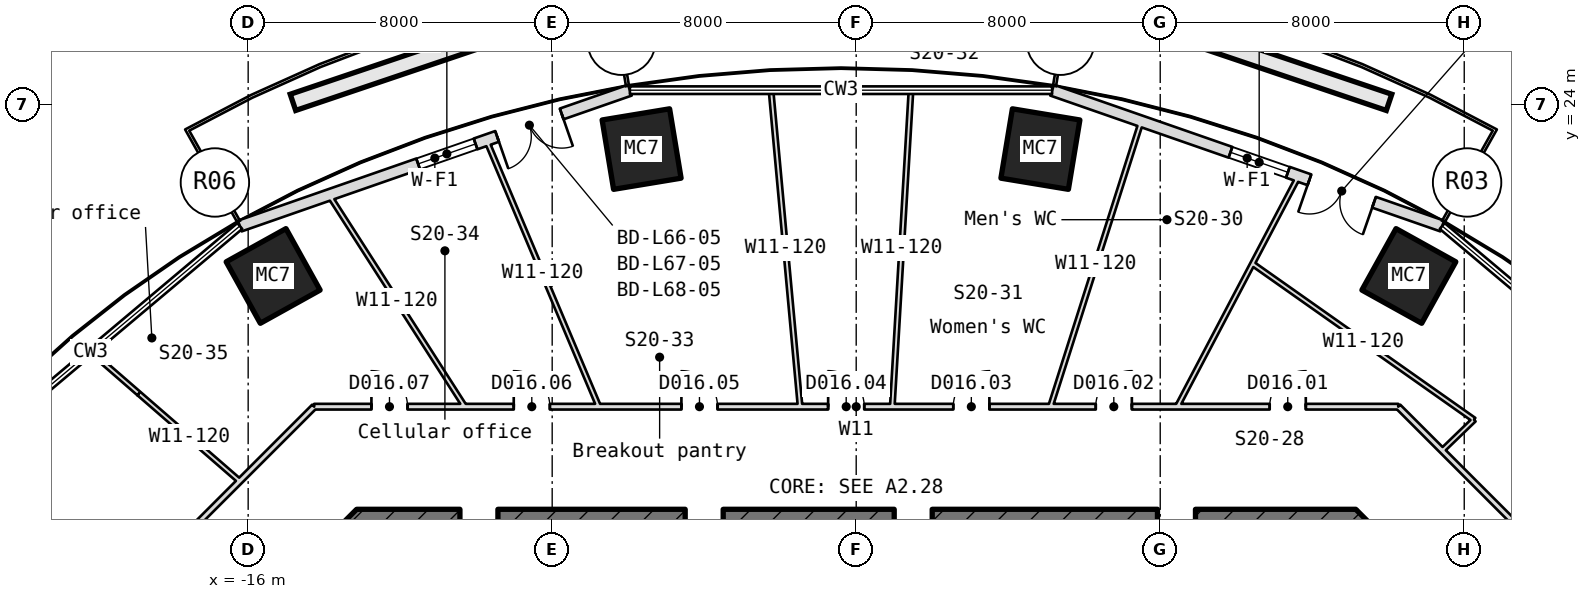
"""IFC4 building model, lengths in metres.
Left out: names, types, materials, properties, quantities, classifications, styles, units other than length and angle.
Written with IfcOpenShell. Run it as: python <this file> out.ifc"""

import sys

from ifc_helpers import new_model, si_unit, direction, frame, frame_2d, origin, origin_2d, place, context, subcontext, project, spatial, rectangle, hollow_rectangle, extrude, element, fill, save


model = new_model("IFC4")
c1 = context("Model", 3, precision=1e-05, world=origin(), true_north=direction((0.0, 1.0)))
c2 = subcontext(c1, "Body", "Model", "MODEL_VIEW")
j1 = project(units=[si_unit("LENGTHUNIT", "METRE"), si_unit("PLANEANGLEUNIT", "RADIAN")], contexts=[c1])
p1 = place(None, origin())
s1 = spatial("IfcSite", under=j1, at=p1, CompositionType="ELEMENT")
p2 = place(p1, origin())
s2 = spatial("IfcBuilding", under=s1, at=p2, CompositionType="ELEMENT")
p3 = place(p2, frame((0.0, 0.0, 296.95)))
s3 = spatial("IfcBuildingStorey", under=s2, at=p3, CompositionType="ELEMENT", Elevation=296.95)
for number, where, z_axis, x_axis in (
    (1, (14.542, 19.49, -0.18), (0.0, 0.0, 1.0), (0.874, -0.486, 0.0)),
    (2, (4.847, 22.828, -0.18), (0.0, 0.0, 1.0), (0.987, -0.163, 0.0)),
    (3, (-5.647, 22.828, -0.18), (0.0, 0.0, 1.0), (0.987, 0.163, 0.0)),
    (4, (-15.343, 19.49, -0.18), (0.0, 0.0, 1.0), (0.874, 0.486, 0.0)),
):
    element("IfcColumn", number, at=place(p3, frame(where, z_axis=z_axis, x_axis=x_axis)), inside=s3, PredefinedType="COLUMN", context=c2, shape_type="SweptSolid", body=[
        extrude(hollow_rectangle(XDim=1.8, YDim=1.85, WallThickness=0.06, at=origin_2d()), origin(), (0.0, 0.0, 1.0), 4.15),
    ])
p4 = place(p3, frame((15.42, 20.804, 0.0), z_axis=(0.0, 0.0, 1.0), x_axis=(-0.944390086162, 0.328827257323, 0.0)))
e5 = element("IfcWall", 5, at=p4, inside=s3, PredefinedType="SOLIDWALL", context=c2, shape_type="SweptSolid", body=[
    extrude(rectangle(XDim=10.87, YDim=0.3, at=frame_2d((5.435, 0.0))), origin(), (0.0, 0.0, 1.0), 3.97),
])
p5 = place(p4, frame((1.9, 0.0, 0.0)))
e6 = element("IfcOpeningElement", 6, at=p5, cuts=e5, PredefinedType="OPENING", context=c2, shape_type="SweptSolid", body=[
    extrude(rectangle(XDim=1.8, YDim=2.4, at=frame_2d((0.9, 1.2))), frame((0.0, 0.16, 0.0), z_axis=(0.0, -1.0, 0.0), x_axis=(1.0, 0.0, 0.0)), (0.0, 0.0, 1.0), 0.32),
])
p6 = place(p4, frame((4.3, 0.0, 0.9)))
e7 = element("IfcOpeningElement", 7, at=p6, cuts=e5, PredefinedType="OPENING", context=c2, shape_type="SweptSolid", body=[
    extrude(rectangle(XDim=1.6, YDim=1.5, at=frame_2d((0.8, 0.75))), frame((0.0, 0.16, 0.0), z_axis=(0.0, -1.0, 0.0), x_axis=(1.0, 0.0, 0.0)), (0.0, 0.0, 1.0), 0.32),
])
p7 = place(p3, frame((-5.955, 24.378, 0.0), z_axis=(0.0, 0.0, 1.0), x_axis=(-0.944390086162, -0.328827257323, 0.0)))
e8 = element("IfcWall", 8, at=p7, inside=s3, PredefinedType="SOLIDWALL", context=c2, shape_type="SweptSolid", body=[
    extrude(rectangle(XDim=10.87, YDim=0.3, at=frame_2d((5.435, 0.0))), origin(), (0.0, 0.0, 1.0), 3.97),
])
p8 = place(p7, frame((1.9, 0.0, 0.0)))
e9 = element("IfcOpeningElement", 9, at=p8, cuts=e8, PredefinedType="OPENING", context=c2, shape_type="SweptSolid", body=[
    extrude(rectangle(XDim=1.8, YDim=2.4, at=frame_2d((0.9, 1.2))), frame((0.0, 0.16, 0.0), z_axis=(0.0, -1.0, 0.0), x_axis=(1.0, 0.0, 0.0)), (0.0, 0.0, 1.0), 0.32),
])
p9 = place(p7, frame((4.3, 0.0, 0.9)))
e10 = element("IfcOpeningElement", 10, at=p9, cuts=e8, PredefinedType="OPENING", context=c2, shape_type="SweptSolid", body=[
    extrude(rectangle(XDim=1.6, YDim=1.5, at=frame_2d((0.8, 0.75))), frame((0.0, 0.16, 0.0), z_axis=(0.0, -1.0, 0.0), x_axis=(1.0, 0.0, 0.0)), (0.0, 0.0, 1.0), 0.32),
])
p10 = place(p3, frame((16.103, 9.897, -0.18), z_axis=(0.0, 0.0, 1.0), x_axis=(-0.707106781187, 0.707106781187, 0.0)))
e11 = element("IfcWall", 11, at=p10, inside=s3, PredefinedType="SHEAR", context=c2, shape_type="SweptSolid", body=[
    extrude(rectangle(XDim=4.533, YDim=0.7, at=frame_2d((2.266, 0.0))), origin(), (0.0, 0.0, 1.0), 4.15),
])
p11 = place(p3, frame((13.145, 13.0, -0.18), z_axis=(0.0, 0.0, 1.0), x_axis=(-1.0, 0.0, 0.0)))
e12 = element("IfcWall", 12, at=p11, inside=s3, PredefinedType="SHEAR", context=c2, shape_type="SweptSolid", body=[
    extrude(rectangle(XDim=26.29, YDim=0.7, at=frame_2d((13.145, 0.0))), origin(), (0.0, 0.0, 1.0), 4.15),
])
p12 = place(p11, frame((22.573, 0.0, 0.18)))
e13 = element("IfcOpeningElement", 13, at=p12, cuts=e12, PredefinedType="OPENING", context=c2, shape_type="SweptSolid", body=[
    extrude(rectangle(XDim=1.0, YDim=2.1, at=frame_2d((0.5, 1.05))), frame((0.0, 0.36, 0.0), z_axis=(0.0, -1.0, 0.0), x_axis=(1.0, 0.0, 0.0)), (0.0, 0.0, 1.0), 0.72),
])
p13 = place(p11, frame((16.645, 0.0, 0.18)))
e14 = element("IfcOpeningElement", 14, at=p13, cuts=e12, PredefinedType="OPENING", context=c2, shape_type="SweptSolid", body=[
    extrude(rectangle(XDim=1.0, YDim=2.1, at=frame_2d((0.5, 1.05))), frame((0.0, 0.36, 0.0), z_axis=(0.0, -1.0, 0.0), x_axis=(1.0, 0.0, 0.0)), (0.0, 0.0, 1.0), 0.72),
])
p14 = place(p11, frame((11.145, 0.0, 0.18)))
e15 = element("IfcOpeningElement", 15, at=p14, cuts=e12, PredefinedType="OPENING", context=c2, shape_type="SweptSolid", body=[
    extrude(rectangle(XDim=1.0, YDim=2.1, at=frame_2d((0.5, 1.05))), frame((0.0, 0.36, 0.0), z_axis=(0.0, -1.0, 0.0), x_axis=(1.0, 0.0, 0.0)), (0.0, 0.0, 1.0), 0.72),
])
p15 = place(p11, frame((4.217, 0.0, 0.18)))
e16 = element("IfcOpeningElement", 16, at=p15, cuts=e12, PredefinedType="OPENING", context=c2, shape_type="SweptSolid", body=[
    extrude(rectangle(XDim=1.0, YDim=2.1, at=frame_2d((0.5, 1.05))), frame((0.0, 0.36, 0.0), z_axis=(0.0, -1.0, 0.0), x_axis=(1.0, 0.0, 0.0)), (0.0, 0.0, 1.0), 0.72),
])
p16 = place(p3, frame((-12.897, 13.103, -0.18), z_axis=(0.0, 0.0, 1.0), x_axis=(-0.707106781187, -0.707106781187, 0.0)))
e17 = element("IfcWall", 17, at=p16, inside=s3, PredefinedType="SHEAR", context=c2, shape_type="SweptSolid", body=[
    extrude(rectangle(XDim=4.533, YDim=0.7, at=frame_2d((2.266, 0.0))), origin(), (0.0, 0.0, 1.0), 4.15),
])
p17 = place(p3, frame((-19.05, 11.263, 0.0), z_axis=(0.0, 0.0, 1.0), x_axis=(0.707106781187, 0.707106781187, 0.0)))
e18 = element("IfcWall", 18, at=p17, inside=s3, PredefinedType="PARTITIONING", context=c2, shape_type="SweptSolid", body=[
    extrude(rectangle(XDim=6.769, YDim=0.15, at=frame_2d((3.385, 0.0))), origin(), (0.0, 0.0, 1.0), 3.97),
])
p18 = place(p3, frame((-16.222, 14.091, 0.0), z_axis=(0.0, 0.0, 1.0), x_axis=(-0.75497337259, 0.655755447313, 0.0)))
e19 = element("IfcWall", 19, at=p18, inside=s3, PredefinedType="PARTITIONING", context=c2, shape_type="SweptSolid", body=[
    extrude(rectangle(XDim=3.514, YDim=0.12, at=frame_2d((1.757, 0.0))), origin(), (0.0, 0.0, 1.0), 3.66),
])
p19 = place(p3, frame((-18.875, 16.395, 0.0), z_axis=(0.0, 0.0, 1.0), x_axis=(-0.754938829858, 0.655795214357, 0.0)))
e20 = element("IfcWall", 20, at=p19, inside=s3, PredefinedType="PARTITIONING", context=c2, shape_type="SweptSolid", body=[
    extrude(rectangle(XDim=1.687, YDim=0.12, at=frame_2d((0.843, 0.0))), origin(), (0.0, 0.0, 1.0), 3.97),
])
p20 = place(p3, frame((-14.263, 16.05, 0.0), z_axis=(0.0, 0.0, 1.0), x_axis=(1.0, 0.0, 0.0)))
e21 = element("IfcWall", 21, at=p20, inside=s3, PredefinedType="PARTITIONING", context=c2, shape_type="SweptSolid", body=[
    extrude(rectangle(XDim=28.527, YDim=0.15, at=frame_2d((14.263, 0.0))), origin(), (0.0, 0.0, 1.0), 3.97),
])
p21 = place(p20, frame((25.144, 0.0, 0.0)))
e22 = element("IfcOpeningElement", 22, at=p21, cuts=e21, PredefinedType="OPENING", context=c2, shape_type="SweptSolid", body=[
    extrude(rectangle(XDim=0.95, YDim=2.1, at=frame_2d((0.475, 1.05))), frame((0.0, 0.085, 0.0), z_axis=(0.0, -1.0, 0.0), x_axis=(1.0, 0.0, 0.0)), (0.0, 0.0, 1.0), 0.17),
])
p22 = place(p20, frame((20.567, 0.0, 0.0)))
e23 = element("IfcOpeningElement", 23, at=p22, cuts=e21, PredefinedType="OPENING", context=c2, shape_type="SweptSolid", body=[
    extrude(rectangle(XDim=0.95, YDim=2.1, at=frame_2d((0.475, 1.05))), frame((0.0, 0.085, 0.0), z_axis=(0.0, -1.0, 0.0), x_axis=(1.0, 0.0, 0.0)), (0.0, 0.0, 1.0), 0.17),
])
p23 = place(p20, frame((16.818, 0.0, 0.0)))
e24 = element("IfcOpeningElement", 24, at=p23, cuts=e21, PredefinedType="OPENING", context=c2, shape_type="SweptSolid", body=[
    extrude(rectangle(XDim=0.95, YDim=2.1, at=frame_2d((0.475, 1.05))), frame((0.0, 0.085, 0.0), z_axis=(0.0, -1.0, 0.0), x_axis=(1.0, 0.0, 0.0)), (0.0, 0.0, 1.0), 0.17),
])
p24 = place(p20, frame((13.525, 0.0, 0.0)))
e25 = element("IfcOpeningElement", 25, at=p24, cuts=e21, PredefinedType="OPENING", context=c2, shape_type="SweptSolid", body=[
    extrude(rectangle(XDim=0.95, YDim=2.1, at=frame_2d((0.475, 1.05))), frame((0.0, 0.085, 0.0), z_axis=(0.0, -1.0, 0.0), x_axis=(1.0, 0.0, 0.0)), (0.0, 0.0, 1.0), 0.17),
])
p25 = place(p20, frame((9.664, 0.0, 0.0)))
e26 = element("IfcOpeningElement", 26, at=p25, cuts=e21, PredefinedType="OPENING", context=c2, shape_type="SweptSolid", body=[
    extrude(rectangle(XDim=0.95, YDim=2.1, at=frame_2d((0.475, 1.05))), frame((0.0, 0.085, 0.0), z_axis=(0.0, -1.0, 0.0), x_axis=(1.0, 0.0, 0.0)), (0.0, 0.0, 1.0), 0.17),
])
p26 = place(p20, frame((5.252, 0.0, 0.0)))
e27 = element("IfcOpeningElement", 27, at=p26, cuts=e21, PredefinedType="OPENING", context=c2, shape_type="SweptSolid", body=[
    extrude(rectangle(XDim=0.95, YDim=2.1, at=frame_2d((0.475, 1.05))), frame((0.0, 0.085, 0.0), z_axis=(0.0, -1.0, 0.0), x_axis=(1.0, 0.0, 0.0)), (0.0, 0.0, 1.0), 0.17),
])
p27 = place(p20, frame((1.507, 0.0, 0.0)))
e28 = element("IfcOpeningElement", 28, at=p27, cuts=e21, PredefinedType="OPENING", context=c2, shape_type="SweptSolid", body=[
    extrude(rectangle(XDim=0.95, YDim=2.1, at=frame_2d((0.475, 1.05))), frame((0.0, 0.085, 0.0), z_axis=(0.0, -1.0, 0.0), x_axis=(1.0, 0.0, 0.0)), (0.0, 0.0, 1.0), 0.17),
])
p28 = place(p3, frame((-10.299, 16.05, 0.0), z_axis=(0.0, 0.0, 1.0), x_axis=(-0.540034071495, 0.841643155752, 0.0)))
e29 = element("IfcWall", 29, at=p28, inside=s3, PredefinedType="PARTITIONING", context=c2, shape_type="SweptSolid", body=[
    extrude(rectangle(XDim=6.619, YDim=0.12, at=frame_2d((3.31, 0.0))), origin(), (0.0, 0.0, 1.0), 3.97),
])
p29 = place(p3, frame((-6.773, 16.05, 0.0), z_axis=(0.0, 0.0, 1.0), x_axis=(-0.388811119227, 0.92131748793, 0.0)))
e30 = element("IfcWall", 30, at=p29, inside=s3, PredefinedType="PARTITIONING", context=c2, shape_type="SweptSolid", body=[
    extrude(rectangle(XDim=7.612, YDim=0.12, at=frame_2d((3.806, 0.0))), origin(), (0.0, 0.0, 1.0), 3.97),
])
p30 = place(p3, frame((-1.476, 16.05, 0.0), z_axis=(0.0, 0.0, 1.0), x_axis=(-0.09154907724, 0.995800565604, 0.0)))
e31 = element("IfcWall", 31, at=p30, inside=s3, PredefinedType="PARTITIONING", context=c2, shape_type="SweptSolid", body=[
    extrude(rectangle(XDim=8.363, YDim=0.12, at=frame_2d((4.182, 0.0))), origin(), (0.0, 0.0, 1.0), 3.97),
])
p31 = place(p3, frame((0.949, 16.05, 0.0), z_axis=(0.0, 0.0, 1.0), x_axis=(0.059056546613, 0.998254639009, 0.0)))
e32 = element("IfcWall", 32, at=p31, inside=s3, PredefinedType="PARTITIONING", context=c2, shape_type="SweptSolid", body=[
    extrude(rectangle(XDim=8.343, YDim=0.12, at=frame_2d((4.171, 0.0))), origin(), (0.0, 0.0, 1.0), 3.97),
])
p32 = place(p3, frame((5.11, 16.05, 0.0), z_axis=(0.0, 0.0, 1.0), x_axis=(0.303413314571, 0.952859045474, 0.0)))
e33 = element("IfcWall", 33, at=p32, inside=s3, PredefinedType="PARTITIONING", context=c2, shape_type="SweptSolid", body=[
    extrude(rectangle(XDim=7.882, YDim=0.12, at=frame_2d((3.941, 0.0))), origin(), (0.0, 0.0, 1.0), 3.97),
])
p33 = place(p3, frame((8.448, 16.05, 0.0), z_axis=(0.0, 0.0, 1.0), x_axis=(0.465797782517, 0.88489119433, 0.0)))
e34 = element("IfcWall", 34, at=p33, inside=s3, PredefinedType="PARTITIONING", context=c2, shape_type="SweptSolid", body=[
    extrude(rectangle(XDim=6.858, YDim=0.12, at=frame_2d((3.429, 0.0))), origin(), (0.0, 0.0, 1.0), 3.97),
])
p34 = place(p3, frame((14.263, 16.05, 0.0), z_axis=(0.0, 0.0, 1.0), x_axis=(0.707106781187, -0.707106781187, 0.0)))
e35 = element("IfcWall", 35, at=p34, inside=s3, PredefinedType="PARTITIONING", context=c2, shape_type="SweptSolid", body=[
    extrude(rectangle(XDim=6.769, YDim=0.15, at=frame_2d((3.385, 0.0))), origin(), (0.0, 0.0, 1.0), 3.97),
])
p35 = place(p3, frame((16.258, 15.706, 0.0), z_axis=(0.0, 0.0, 1.0), x_axis=(-0.817482799525, 0.57595301239, 0.0)))
e36 = element("IfcWall", 36, at=p35, inside=s3, PredefinedType="PARTITIONING", context=c2, shape_type="SweptSolid", body=[
    extrude(rectangle(XDim=7.13, YDim=0.12, at=frame_2d((3.565, 0.0))), origin(), (0.0, 0.0, 1.0), 3.97),
])
p36 = place(p3, frame((16.258, 15.706, 0.0), z_axis=(0.0, 0.0, 1.0), x_axis=(-0.719134696688, -0.694870698778, 0.0)))
e37 = element("IfcWall", 37, at=p36, inside=s3, PredefinedType="PARTITIONING", context=c2, shape_type="SweptSolid", body=[
    extrude(rectangle(XDim=1.167, YDim=0.12, at=frame_2d((0.583, 0.0))), origin(), (0.0, 0.0, 1.0), 3.97),
])
p37 = place(p5, origin())
e38 = element("IfcDoor", 38, at=p37, inside=s3, OperationType="SINGLE_SWING_LEFT", PredefinedType="DOOR", context=c2, shape_type="SweptSolid", body=[
    extrude(rectangle(XDim=1.8, YDim=2.4, at=frame_2d((0.9, 1.2))), frame((0.0, 0.025, 0.0), z_axis=(0.0, -1.0, 0.0), x_axis=(1.0, 0.0, 0.0)), (0.0, 0.0, 1.0), 0.05),
])
fill(e6, e38)
p38 = place(p6, origin())
e39 = element("IfcWindow", 39, at=p38, inside=s3, PartitioningType="SINGLE_PANEL", PredefinedType="WINDOW", context=c2, shape_type="SweptSolid", body=[
    extrude(rectangle(XDim=1.6, YDim=1.5, at=frame_2d((0.8, 0.75))), frame((0.0, 0.03, 0.0), z_axis=(0.0, -1.0, 0.0), x_axis=(1.0, 0.0, 0.0)), (0.0, 0.0, 1.0), 0.06),
])
fill(e7, e39)
p39 = place(p8, origin())
e40 = element("IfcDoor", 40, at=p39, inside=s3, OperationType="SINGLE_SWING_LEFT", PredefinedType="DOOR", context=c2, shape_type="SweptSolid", body=[
    extrude(rectangle(XDim=1.8, YDim=2.4, at=frame_2d((0.9, 1.2))), frame((0.0, 0.025, 0.0), z_axis=(0.0, -1.0, 0.0), x_axis=(1.0, 0.0, 0.0)), (0.0, 0.0, 1.0), 0.05),
])
fill(e9, e40)
p40 = place(p9, origin())
e41 = element("IfcWindow", 41, at=p40, inside=s3, PartitioningType="SINGLE_PANEL", PredefinedType="WINDOW", context=c2, shape_type="SweptSolid", body=[
    extrude(rectangle(XDim=1.6, YDim=1.5, at=frame_2d((0.8, 0.75))), frame((0.0, 0.03, 0.0), z_axis=(0.0, -1.0, 0.0), x_axis=(1.0, 0.0, 0.0)), (0.0, 0.0, 1.0), 0.06),
])
fill(e10, e41)
p41 = place(p21, origin())
e42 = element("IfcDoor", 42, at=p41, inside=s3, OperationType="SINGLE_SWING_RIGHT", PredefinedType="DOOR", context=c2, shape_type="SweptSolid", body=[
    extrude(rectangle(XDim=0.95, YDim=2.1, at=frame_2d((0.475, 1.05))), frame((0.0, 0.025, 0.0), z_axis=(0.0, -1.0, 0.0), x_axis=(1.0, 0.0, 0.0)), (0.0, 0.0, 1.0), 0.05),
])
fill(e22, e42)
p42 = place(p22, origin())
e43 = element("IfcDoor", 43, at=p42, inside=s3, OperationType="SINGLE_SWING_RIGHT", PredefinedType="DOOR", context=c2, shape_type="SweptSolid", body=[
    extrude(rectangle(XDim=0.95, YDim=2.1, at=frame_2d((0.475, 1.05))), frame((0.0, 0.025, 0.0), z_axis=(0.0, -1.0, 0.0), x_axis=(1.0, 0.0, 0.0)), (0.0, 0.0, 1.0), 0.05),
])
fill(e23, e43)
p43 = place(p23, origin())
e44 = element("IfcDoor", 44, at=p43, inside=s3, OperationType="SINGLE_SWING_RIGHT", PredefinedType="DOOR", context=c2, shape_type="SweptSolid", body=[
    extrude(rectangle(XDim=0.95, YDim=2.1, at=frame_2d((0.475, 1.05))), frame((0.0, 0.025, 0.0), z_axis=(0.0, -1.0, 0.0), x_axis=(1.0, 0.0, 0.0)), (0.0, 0.0, 1.0), 0.05),
])
fill(e24, e44)
p44 = place(p24, origin())
e45 = element("IfcDoor", 45, at=p44, inside=s3, OperationType="SINGLE_SWING_RIGHT", PredefinedType="DOOR", context=c2, shape_type="SweptSolid", body=[
    extrude(rectangle(XDim=0.95, YDim=2.1, at=frame_2d((0.475, 1.05))), frame((0.0, 0.025, 0.0), z_axis=(0.0, -1.0, 0.0), x_axis=(1.0, 0.0, 0.0)), (0.0, 0.0, 1.0), 0.05),
])
fill(e25, e45)
p45 = place(p25, origin())
e46 = element("IfcDoor", 46, at=p45, inside=s3, OperationType="SINGLE_SWING_RIGHT", PredefinedType="DOOR", context=c2, shape_type="SweptSolid", body=[
    extrude(rectangle(XDim=0.95, YDim=2.1, at=frame_2d((0.475, 1.05))), frame((0.0, 0.025, 0.0), z_axis=(0.0, -1.0, 0.0), x_axis=(1.0, 0.0, 0.0)), (0.0, 0.0, 1.0), 0.05),
])
fill(e26, e46)
p46 = place(p26, origin())
e47 = element("IfcDoor", 47, at=p46, inside=s3, OperationType="SINGLE_SWING_RIGHT", PredefinedType="DOOR", context=c2, shape_type="SweptSolid", body=[
    extrude(rectangle(XDim=0.95, YDim=2.1, at=frame_2d((0.475, 1.05))), frame((0.0, 0.025, 0.0), z_axis=(0.0, -1.0, 0.0), x_axis=(1.0, 0.0, 0.0)), (0.0, 0.0, 1.0), 0.05),
])
fill(e27, e47)
p47 = place(p27, origin())
e48 = element("IfcDoor", 48, at=p47, inside=s3, OperationType="SINGLE_SWING_RIGHT", PredefinedType="DOOR", context=c2, shape_type="SweptSolid", body=[
    extrude(rectangle(XDim=0.95, YDim=2.1, at=frame_2d((0.475, 1.05))), frame((0.0, 0.025, 0.0), z_axis=(0.0, -1.0, 0.0), x_axis=(1.0, 0.0, 0.0)), (0.0, 0.0, 1.0), 0.05),
])
fill(e28, e48)
save(model, sys.argv[1])
